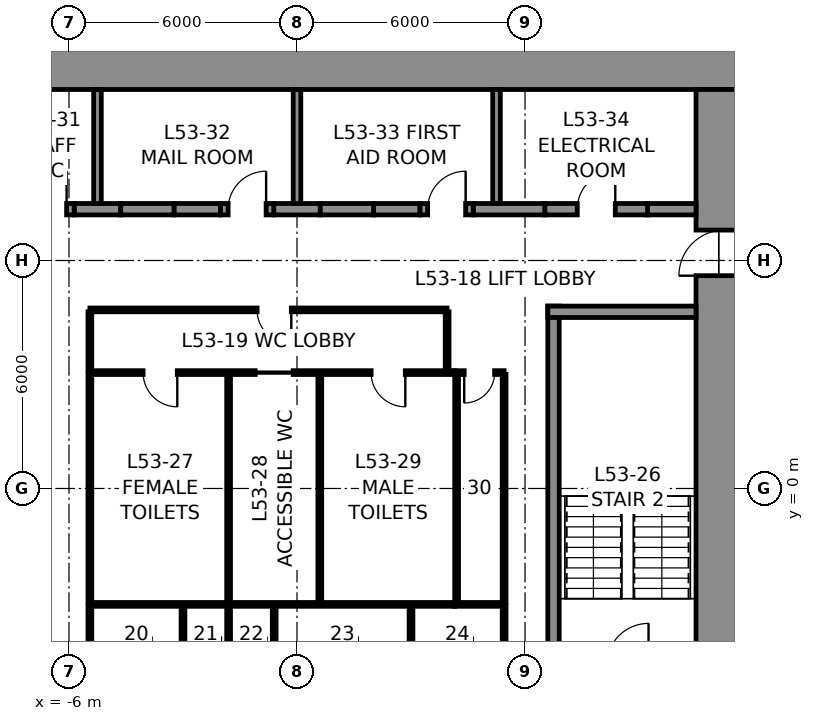
"""IFC4 building model, lengths in metres.
Left out: names, types, materials, properties, quantities, classifications, styles, units other than length and angle.
Written with IfcOpenShell. Run it as: python <this file> out.ifc"""

import sys

from ifc_helpers import new_model, si_unit, direction, frame, frame_2d, origin, place, context, subcontext, project, spatial, rectangle, extrude, element, fill, save


model = new_model("IFC4")
c1 = context("Model", 3, precision=1e-05, world=origin(), true_north=direction((0.0, 1.0)))
c2 = subcontext(c1, "Body", "Model", "MODEL_VIEW")
j1 = project(units=[si_unit("LENGTHUNIT", "METRE"), si_unit("PLANEANGLEUNIT", "RADIAN")], contexts=[c1])
p1 = place(None, origin())
s1 = spatial("IfcSite", under=j1, at=p1, CompositionType="ELEMENT")
p2 = place(p1, origin())
s2 = spatial("IfcBuilding", under=s1, at=p2, CompositionType="ELEMENT")
p3 = place(p2, frame((0.0, 0.0, 241.8)))
s3 = spatial("IfcBuildingStorey", under=s2, at=p3, CompositionType="ELEMENT", Elevation=241.8)
p4 = place(p3, frame((-12.0, 11.25, 0.0), z_axis=(0.0, 0.0, 1.0), x_axis=(1.0, 0.0, 0.0)))
e1 = element("IfcWall", 1, at=p4, inside=s3, PredefinedType="SHEAR", context=c2, shape_type="SweptSolid", body=[
    extrude(rectangle(XDim=24.0, YDim=1.5, at=frame_2d((12.0, 0.0))), origin(), (0.0, 0.0, 1.0), 4.0),
])
p5 = place(p3, frame((11.25, 10.5, 0.0), z_axis=(0.0, 0.0, 1.0), x_axis=(0.0, -1.0, 0.0)))
e2 = element("IfcWall", 2, at=p5, inside=s3, PredefinedType="SHEAR", context=c2, shape_type="SweptSolid", body=[
    extrude(rectangle(XDim=21.0, YDim=1.5, at=frame_2d((10.5, 0.0))), origin(), (0.0, 0.0, 1.0), 4.0),
])
p6 = place(p5, frame((3.7, 0.0, 0.0)))
e3 = element("IfcOpeningElement", 3, at=p6, cuts=e2, PredefinedType="OPENING", context=c2, shape_type="SweptSolid", body=[
    extrude(rectangle(XDim=1.2, YDim=2.3, at=frame_2d((0.6, 1.15))), frame((0.0, 0.76, 0.0), z_axis=(0.0, -1.0, 0.0), x_axis=(1.0, 0.0, 0.0)), (0.0, 0.0, 1.0), 1.52),
])
p7 = place(p5, frame((16.1, 0.0, 0.0)))
e4 = element("IfcOpeningElement", 4, at=p7, cuts=e2, PredefinedType="OPENING", context=c2, shape_type="SweptSolid", body=[
    extrude(rectangle(XDim=1.2, YDim=2.3, at=frame_2d((0.6, 1.15))), frame((0.0, 0.76, 0.0), z_axis=(0.0, -1.0, 0.0), x_axis=(1.0, 0.0, 0.0)), (0.0, 0.0, 1.0), 1.52),
])
for number, where, z_axis, x_axis in (
    (5, (-5.863, 7.35, 0.0), (0.0, 0.0, 1.0), (1.0, 0.0, 0.0)),
    (6, (-3.238, 7.35, 0.0), (0.0, 0.0, 1.0), (1.0, 0.0, 0.0)),
    (7, (-0.613, 7.35, 0.0), (0.0, 0.0, 1.0), (1.0, 0.0, 0.0)),
    (8, (2.012, 7.35, 0.0), (0.0, 0.0, 1.0), (1.0, 0.0, 0.0)),
):
    element("IfcWall", number, at=place(p3, frame(where, z_axis=z_axis, x_axis=x_axis)), inside=s3, PredefinedType="SHEAR", context=c2, shape_type="SweptSolid", body=[
        extrude(rectangle(XDim=1.225, YDim=0.3, at=frame_2d((0.613, 0.0))), origin(), (0.0, 0.0, 1.0), 4.0),
    ])
p8 = place(p3, frame((4.637, 7.35, 0.0), z_axis=(0.0, 0.0, 1.0), x_axis=(1.0, 0.0, 0.0)))
e9 = element("IfcWall", 9, at=p8, inside=s3, PredefinedType="SHEAR", context=c2, shape_type="SweptSolid", body=[
    extrude(rectangle(XDim=1.887, YDim=0.3, at=frame_2d((0.944, 0.0))), origin(), (0.0, 0.0, 1.0), 4.0),
])
p9 = place(p3, frame((9.225, 7.35, 0.0), z_axis=(0.0, 0.0, 1.0), x_axis=(1.0, 0.0, 0.0)))
e10 = element("IfcWall", 10, at=p9, inside=s3, PredefinedType="SHEAR", context=c2, shape_type="SweptSolid", body=[
    extrude(rectangle(XDim=1.275, YDim=0.3, at=frame_2d((0.637, 0.0))), origin(), (0.0, 0.0, 1.0), 4.0),
])
p10 = place(p3, frame((-7.262, 7.35, 0.0), z_axis=(0.0, 0.0, 1.0), x_axis=(1.0, 0.0, 0.0)))
e11 = element("IfcWall", 11, at=p10, inside=s3, PredefinedType="PARTITIONING", context=c2, shape_type="SweptSolid", body=[
    extrude(rectangle(XDim=1.4, YDim=0.3, at=frame_2d((0.7, 0.0))), origin(), (0.0, 0.0, 1.0), 4.0),
])
p11 = place(p10, frame((0.2, 0.0, 0.0)))
e12 = element("IfcOpeningElement", 12, at=p11, cuts=e11, PredefinedType="OPENING", context=c2, shape_type="SweptSolid", body=[
    extrude(rectangle(XDim=1.0, YDim=2.3, at=frame_2d((0.5, 1.15))), frame((0.0, 0.16, 0.0), z_axis=(0.0, -1.0, 0.0), x_axis=(1.0, 0.0, 0.0)), (0.0, 0.0, 1.0), 0.32),
])
p12 = place(p3, frame((-4.637, 7.35, 0.0), z_axis=(0.0, 0.0, 1.0), x_axis=(1.0, 0.0, 0.0)))
e13 = element("IfcWall", 13, at=p12, inside=s3, PredefinedType="PARTITIONING", context=c2, shape_type="SweptSolid", body=[
    extrude(rectangle(XDim=1.4, YDim=0.3, at=frame_2d((0.7, 0.0))), origin(), (0.0, 0.0, 1.0), 4.0),
])
p13 = place(p3, frame((-2.012, 7.35, 0.0), z_axis=(0.0, 0.0, 1.0), x_axis=(1.0, 0.0, 0.0)))
e14 = element("IfcWall", 14, at=p13, inside=s3, PredefinedType="PARTITIONING", context=c2, shape_type="SweptSolid", body=[
    extrude(rectangle(XDim=1.4, YDim=0.3, at=frame_2d((0.7, 0.0))), origin(), (0.0, 0.0, 1.0), 4.0),
])
p14 = place(p13, frame((0.2, 0.0, 0.0)))
e15 = element("IfcOpeningElement", 15, at=p14, cuts=e14, PredefinedType="OPENING", context=c2, shape_type="SweptSolid", body=[
    extrude(rectangle(XDim=1.0, YDim=2.3, at=frame_2d((0.5, 1.15))), frame((0.0, 0.16, 0.0), z_axis=(0.0, -1.0, 0.0), x_axis=(1.0, 0.0, 0.0)), (0.0, 0.0, 1.0), 0.32),
])
p15 = place(p3, frame((0.613, 7.35, 0.0), z_axis=(0.0, 0.0, 1.0), x_axis=(1.0, 0.0, 0.0)))
e16 = element("IfcWall", 16, at=p15, inside=s3, PredefinedType="PARTITIONING", context=c2, shape_type="SweptSolid", body=[
    extrude(rectangle(XDim=1.4, YDim=0.3, at=frame_2d((0.7, 0.0))), origin(), (0.0, 0.0, 1.0), 4.0),
])
p16 = place(p3, frame((3.238, 7.35, 0.0), z_axis=(0.0, 0.0, 1.0), x_axis=(1.0, 0.0, 0.0)))
e17 = element("IfcWall", 17, at=p16, inside=s3, PredefinedType="PARTITIONING", context=c2, shape_type="SweptSolid", body=[
    extrude(rectangle(XDim=1.4, YDim=0.3, at=frame_2d((0.7, 0.0))), origin(), (0.0, 0.0, 1.0), 4.0),
])
p17 = place(p16, frame((0.2, 0.0, 0.0)))
e18 = element("IfcOpeningElement", 18, at=p17, cuts=e17, PredefinedType="OPENING", context=c2, shape_type="SweptSolid", body=[
    extrude(rectangle(XDim=1.0, YDim=2.3, at=frame_2d((0.5, 1.15))), frame((0.0, 0.16, 0.0), z_axis=(0.0, -1.0, 0.0), x_axis=(1.0, 0.0, 0.0)), (0.0, 0.0, 1.0), 0.32),
])
p18 = place(p3, frame((6.525, 7.35, 0.0), z_axis=(0.0, 0.0, 1.0), x_axis=(1.0, 0.0, 0.0)))
e19 = element("IfcWall", 19, at=p18, inside=s3, PredefinedType="PARTITIONING", context=c2, shape_type="SweptSolid", body=[
    extrude(rectangle(XDim=2.7, YDim=0.3, at=frame_2d((1.35, 0.0))), origin(), (0.0, 0.0, 1.0), 4.0),
])
p19 = place(p18, frame((0.85, 0.0, 0.0)))
e20 = element("IfcOpeningElement", 20, at=p19, cuts=e19, PredefinedType="OPENING", context=c2, shape_type="SweptSolid", body=[
    extrude(rectangle(XDim=1.0, YDim=2.3, at=frame_2d((0.5, 1.15))), frame((0.0, 0.16, 0.0), z_axis=(0.0, -1.0, 0.0), x_axis=(1.0, 0.0, 0.0)), (0.0, 0.0, 1.0), 0.32),
])
for number, where, z_axis, x_axis in (
    (21, (-5.25, 7.5, 0.0), (0.0, 0.0, 1.0), (0.0, 1.0, 0.0)),
    (22, (0.0, 7.5, 0.0), (0.0, 0.0, 1.0), (0.0, 1.0, 0.0)),
    (23, (5.25, 7.5, 0.0), (0.0, 0.0, 1.0), (0.0, 1.0, 0.0)),
):
    element("IfcWall", number, at=place(p3, frame(where, z_axis=z_axis, x_axis=x_axis)), inside=s3, PredefinedType="PARTITIONING", context=c2, shape_type="SweptSolid", body=[
        extrude(rectangle(XDim=3.0, YDim=0.2, at=frame_2d((1.5, 0.0))), origin(), (0.0, 0.0, 1.0), 4.0),
    ])
p20 = place(p3, frame((6.75, -4.8, 0.0), z_axis=(0.0, 0.0, 1.0), x_axis=(0.0, 1.0, 0.0)))
e24 = element("IfcWall", 24, at=p20, inside=s3, PredefinedType="SOLIDWALL", context=c2, shape_type="SweptSolid", body=[
    extrude(rectangle(XDim=9.6, YDim=0.3, at=frame_2d((4.8, 0.0))), origin(), (0.0, 0.0, 1.0), 3.75),
])
p21 = place(p3, frame((6.6, 4.65, 0.0), z_axis=(0.0, 0.0, 1.0), x_axis=(1.0, 0.0, 0.0)))
e25 = element("IfcWall", 25, at=p21, inside=s3, PredefinedType="SOLIDWALL", context=c2, shape_type="SweptSolid", body=[
    extrude(rectangle(XDim=3.9, YDim=0.3, at=frame_2d((1.95, 0.0))), origin(), (0.0, 0.0, 1.0), 3.75),
])
p22 = place(p3, frame((-5.45, 3.05, 0.0), z_axis=(0.0, 0.0, 1.0), x_axis=(1.0, 0.0, 0.0)))
e26 = element("IfcWall", 26, at=p22, inside=s3, PredefinedType="PARTITIONING", context=c2, shape_type="SweptSolid", body=[
    extrude(rectangle(XDim=9.6, YDim=0.1, at=frame_2d((4.8, 0.0))), origin(), (0.0, 0.0, 1.0), 3.75),
])
p23 = place(p22, frame((1.4, 0.0, 0.0)))
e27 = element("IfcOpeningElement", 27, at=p23, cuts=e26, PredefinedType="OPENING", context=c2, shape_type="SweptSolid", body=[
    extrude(rectangle(XDim=0.9, YDim=2.3, at=frame_2d((0.45, 1.15))), frame((0.0, 0.06, 0.0), z_axis=(0.0, -1.0, 0.0), x_axis=(1.0, 0.0, 0.0)), (0.0, 0.0, 1.0), 0.12),
])
p24 = place(p22, frame((4.35, 0.0, 0.0)))
e28 = element("IfcOpeningElement", 28, at=p24, cuts=e26, PredefinedType="OPENING", context=c2, shape_type="SweptSolid", body=[
    extrude(rectangle(XDim=1.0, YDim=2.3, at=frame_2d((0.5, 1.15))), frame((0.0, 0.06, 0.0), z_axis=(0.0, -1.0, 0.0), x_axis=(1.0, 0.0, 0.0)), (0.0, 0.0, 1.0), 0.12),
])
p25 = place(p22, frame((7.4, 0.0, 0.0)))
e29 = element("IfcOpeningElement", 29, at=p25, cuts=e26, PredefinedType="OPENING", context=c2, shape_type="SweptSolid", body=[
    extrude(rectangle(XDim=0.9, YDim=2.3, at=frame_2d((0.45, 1.15))), frame((0.0, 0.06, 0.0), z_axis=(0.0, -1.0, 0.0), x_axis=(1.0, 0.0, 0.0)), (0.0, 0.0, 1.0), 0.12),
])
p26 = place(p3, frame((4.15, 3.05, 0.0), z_axis=(0.0, 0.0, 1.0), x_axis=(1.0, 0.0, 0.0)))
e30 = element("IfcWall", 30, at=p26, inside=s3, PredefinedType="PARTITIONING", context=c2, shape_type="SweptSolid", body=[
    extrude(rectangle(XDim=1.3, YDim=0.1, at=frame_2d((0.65, 0.0))), origin(), (0.0, 0.0, 1.0), 3.75),
])
p27 = place(p26, frame((0.25, 0.0, 0.0)))
e31 = element("IfcOpeningElement", 31, at=p27, cuts=e30, PredefinedType="OPENING", context=c2, shape_type="SweptSolid", body=[
    extrude(rectangle(XDim=0.8, YDim=2.3, at=frame_2d((0.4, 1.15))), frame((0.0, 0.06, 0.0), z_axis=(0.0, -1.0, 0.0), x_axis=(1.0, 0.0, 0.0)), (0.0, 0.0, 1.0), 0.12),
])
p28 = place(p3, frame((4.15, -3.05, 0.0), z_axis=(0.0, 0.0, 1.0), x_axis=(-1.0, 0.0, 0.0)))
e32 = element("IfcWall", 32, at=p28, inside=s3, PredefinedType="PARTITIONING", context=c2, shape_type="SweptSolid", body=[
    extrude(rectangle(XDim=9.6, YDim=0.1, at=frame_2d((4.8, 0.0))), origin(), (0.0, 0.0, 1.0), 3.75),
])
p29 = place(p3, frame((5.45, -3.05, 0.0), z_axis=(0.0, 0.0, 1.0), x_axis=(-1.0, 0.0, 0.0)))
e33 = element("IfcWall", 33, at=p29, inside=s3, PredefinedType="PARTITIONING", context=c2, shape_type="SweptSolid", body=[
    extrude(rectangle(XDim=1.3, YDim=0.1, at=frame_2d((0.65, 0.0))), origin(), (0.0, 0.0, 1.0), 3.75),
])
for number, where, z_axis, x_axis in (
    (34, (5.45, 3.0, 0.0), (0.0, 0.0, 1.0), (0.0, -1.0, 0.0)),
    (35, (-5.45, -3.0, 0.0), (0.0, 0.0, 1.0), (0.0, 1.0, 0.0)),
    (36, (-1.8, -3.0, 0.0), (0.0, 0.0, 1.0), (0.0, 1.0, 0.0)),
    (37, (0.6, -3.0, 0.0), (0.0, 0.0, 1.0), (0.0, 1.0, 0.0)),
    (38, (4.2, -3.0, 0.0), (0.0, 0.0, 1.0), (0.0, 1.0, 0.0)),
):
    element("IfcWall", number, at=place(p3, frame(where, z_axis=z_axis, x_axis=x_axis)), inside=s3, PredefinedType="PARTITIONING", context=c2, shape_type="SweptSolid", body=[
        extrude(rectangle(XDim=6.0, YDim=0.1, at=frame_2d((3.0, 0.0))), origin(), (0.0, 0.0, 1.0), 3.75),
    ])
p30 = place(p3, frame((-5.45, 4.7, 0.0), z_axis=(0.0, 0.0, 1.0), x_axis=(1.0, 0.0, 0.0)))
e39 = element("IfcWall", 39, at=p30, inside=s3, PredefinedType="PARTITIONING", context=c2, shape_type="SweptSolid", body=[
    extrude(rectangle(XDim=9.4, YDim=0.1, at=frame_2d((4.7, 0.0))), origin(), (0.0, 0.0, 1.0), 3.75),
])
p31 = place(p30, frame((4.4, 0.0, 0.0)))
e40 = element("IfcOpeningElement", 40, at=p31, cuts=e39, PredefinedType="OPENING", context=c2, shape_type="SweptSolid", body=[
    extrude(rectangle(XDim=0.9, YDim=2.3, at=frame_2d((0.45, 1.15))), frame((0.0, 0.06, 0.0), z_axis=(0.0, -1.0, 0.0), x_axis=(1.0, 0.0, 0.0)), (0.0, 0.0, 1.0), 0.12),
])
for number, where, z_axis, x_axis in (
    (41, (-5.45, 3.1, 0.0), (0.0, 0.0, 1.0), (0.0, 1.0, 0.0)),
    (42, (3.95, 3.1, 0.0), (0.0, 0.0, 1.0), (0.0, 1.0, 0.0)),
    (43, (-5.45, -3.1, 0.0), (0.0, 0.0, 1.0), (0.0, -1.0, 0.0)),
    (44, (5.45, -3.1, 0.0), (0.0, 0.0, 1.0), (0.0, -1.0, 0.0)),
    (45, (-3.0, -3.1, 0.0), (0.0, 0.0, 1.0), (0.0, -1.0, 0.0)),
    (46, (-1.8, -3.1, 0.0), (0.0, 0.0, 1.0), (0.0, -1.0, 0.0)),
    (47, (-0.6, -3.1, 0.0), (0.0, 0.0, 1.0), (0.0, -1.0, 0.0)),
    (48, (3.0, -3.1, 0.0), (0.0, 0.0, 1.0), (0.0, -1.0, 0.0)),
):
    element("IfcWall", number, at=place(p3, frame(where, z_axis=z_axis, x_axis=x_axis)), inside=s3, PredefinedType="PARTITIONING", context=c2, shape_type="SweptSolid", body=[
        extrude(rectangle(XDim=1.55, YDim=0.1, at=frame_2d((0.775, 0.0))), origin(), (0.0, 0.0, 1.0), 3.75),
    ])
p32 = place(p23, frame((0.9, 0.0, 0.0), z_axis=(0.0, 0.0, 1.0), x_axis=(-1.0, 0.0, 0.0)))
e49 = element("IfcDoor", 49, at=p32, inside=s3, OperationType="SINGLE_SWING_LEFT", PredefinedType="DOOR", context=c2, shape_type="SweptSolid", body=[
    extrude(rectangle(XDim=0.9, YDim=2.3, at=frame_2d((0.45, 1.15))), frame((0.0, 0.025, 0.0), z_axis=(0.0, -1.0, 0.0), x_axis=(1.0, 0.0, 0.0)), (0.0, 0.0, 1.0), 0.05),
])
fill(e27, e49)
p33 = place(p24, frame((1.0, 0.0, 0.0), z_axis=(0.0, 0.0, 1.0), x_axis=(-1.0, 0.0, 0.0)))
e50 = element("IfcDoor", 50, at=p33, inside=s3, OperationType="SLIDING_TO_LEFT", PredefinedType="DOOR", context=c2, shape_type="SweptSolid", body=[
    extrude(rectangle(XDim=1.0, YDim=2.3, at=frame_2d((0.5, 1.15))), frame((0.0, 0.025, 0.0), z_axis=(0.0, -1.0, 0.0), x_axis=(1.0, 0.0, 0.0)), (0.0, 0.0, 1.0), 0.05),
])
fill(e28, e50)
p34 = place(p25, frame((0.9, 0.0, 0.0), z_axis=(0.0, 0.0, 1.0), x_axis=(-1.0, 0.0, 0.0)))
e51 = element("IfcDoor", 51, at=p34, inside=s3, OperationType="SINGLE_SWING_LEFT", PredefinedType="DOOR", context=c2, shape_type="SweptSolid", body=[
    extrude(rectangle(XDim=0.9, YDim=2.3, at=frame_2d((0.45, 1.15))), frame((0.0, 0.025, 0.0), z_axis=(0.0, -1.0, 0.0), x_axis=(1.0, 0.0, 0.0)), (0.0, 0.0, 1.0), 0.05),
])
fill(e29, e51)
p35 = place(p27, frame((0.8, 0.0, 0.0), z_axis=(0.0, 0.0, 1.0), x_axis=(-1.0, 0.0, 0.0)))
e52 = element("IfcDoor", 52, at=p35, inside=s3, OperationType="SINGLE_SWING_RIGHT", PredefinedType="DOOR", context=c2, shape_type="SweptSolid", body=[
    extrude(rectangle(XDim=0.8, YDim=2.3, at=frame_2d((0.4, 1.15))), frame((0.0, 0.025, 0.0), z_axis=(0.0, -1.0, 0.0), x_axis=(1.0, 0.0, 0.0)), (0.0, 0.0, 1.0), 0.05),
])
fill(e31, e52)
p36 = place(p31, frame((0.9, 0.0, 0.0), z_axis=(0.0, 0.0, 1.0), x_axis=(-1.0, 0.0, 0.0)))
e53 = element("IfcDoor", 53, at=p36, inside=s3, OperationType="SINGLE_SWING_LEFT", PredefinedType="DOOR", context=c2, shape_type="SweptSolid", body=[
    extrude(rectangle(XDim=0.9, YDim=2.3, at=frame_2d((0.45, 1.15))), frame((0.0, 0.025, 0.0), z_axis=(0.0, -1.0, 0.0), x_axis=(1.0, 0.0, 0.0)), (0.0, 0.0, 1.0), 0.05),
])
fill(e40, e53)
p37 = place(p11, origin())
e54 = element("IfcDoor", 54, at=p37, inside=s3, OperationType="SINGLE_SWING_RIGHT", PredefinedType="DOOR", context=c2, shape_type="SweptSolid", body=[
    extrude(rectangle(XDim=1.0, YDim=2.3, at=frame_2d((0.5, 1.15))), frame((0.0, 0.025, 0.0), z_axis=(0.0, -1.0, 0.0), x_axis=(1.0, 0.0, 0.0)), (0.0, 0.0, 1.0), 0.05),
])
fill(e12, e54)
p38 = place(p14, origin())
e55 = element("IfcDoor", 55, at=p38, inside=s3, OperationType="SINGLE_SWING_RIGHT", PredefinedType="DOOR", context=c2, shape_type="SweptSolid", body=[
    extrude(rectangle(XDim=1.0, YDim=2.3, at=frame_2d((0.5, 1.15))), frame((0.0, 0.025, 0.0), z_axis=(0.0, -1.0, 0.0), x_axis=(1.0, 0.0, 0.0)), (0.0, 0.0, 1.0), 0.05),
])
fill(e15, e55)
p39 = place(p17, origin())
e56 = element("IfcDoor", 56, at=p39, inside=s3, OperationType="SINGLE_SWING_RIGHT", PredefinedType="DOOR", context=c2, shape_type="SweptSolid", body=[
    extrude(rectangle(XDim=1.0, YDim=2.3, at=frame_2d((0.5, 1.15))), frame((0.0, 0.025, 0.0), z_axis=(0.0, -1.0, 0.0), x_axis=(1.0, 0.0, 0.0)), (0.0, 0.0, 1.0), 0.05),
])
fill(e18, e56)
p40 = place(p19, origin())
e57 = element("IfcDoor", 57, at=p40, inside=s3, OperationType="SINGLE_SWING_RIGHT", PredefinedType="DOOR", context=c2, shape_type="SweptSolid", body=[
    extrude(rectangle(XDim=1.0, YDim=2.3, at=frame_2d((0.5, 1.15))), frame((0.0, 0.025, 0.0), z_axis=(0.0, -1.0, 0.0), x_axis=(1.0, 0.0, 0.0)), (0.0, 0.0, 1.0), 0.05),
])
fill(e20, e57)
p41 = place(p6, frame((1.2, 0.0, 0.0), z_axis=(0.0, 0.0, 1.0), x_axis=(-1.0, 0.0, 0.0)))
e58 = element("IfcDoor", 58, at=p41, inside=s3, OperationType="SINGLE_SWING_LEFT", PredefinedType="DOOR", context=c2, shape_type="SweptSolid", body=[
    extrude(rectangle(XDim=1.2, YDim=2.3, at=frame_2d((0.6, 1.15))), frame((0.0, 0.025, 0.0), z_axis=(0.0, -1.0, 0.0), x_axis=(1.0, 0.0, 0.0)), (0.0, 0.0, 1.0), 0.05),
])
fill(e3, e58)
save(model, sys.argv[1])
